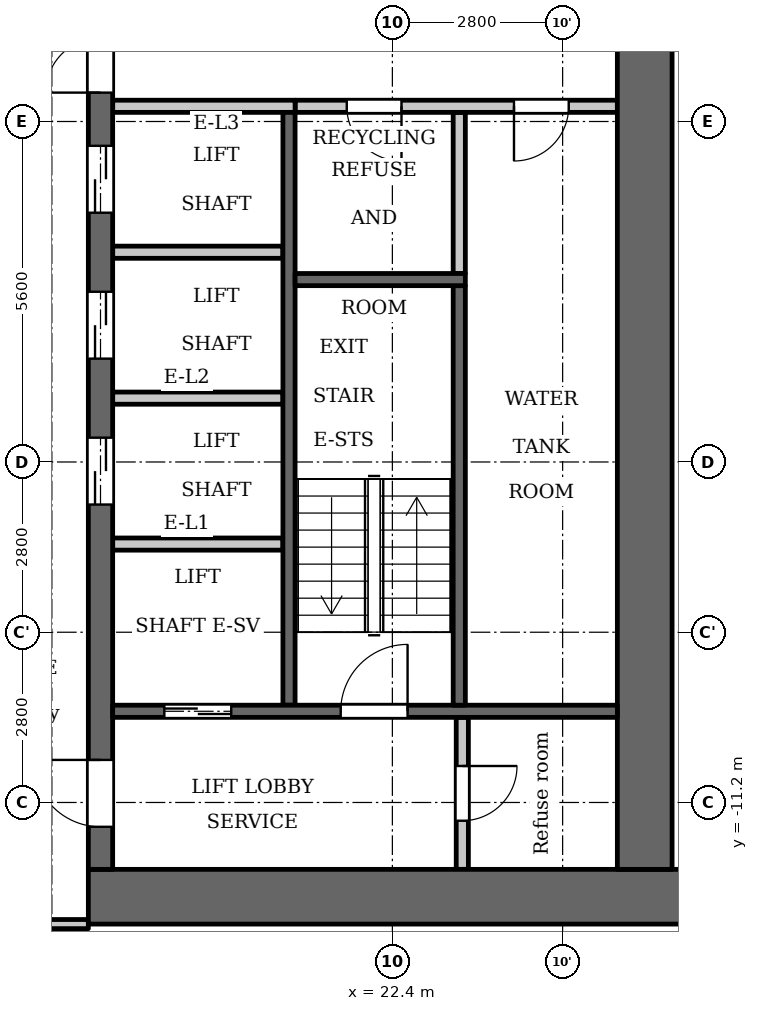
"""IFC4 building model, lengths in metres.
Left out: names, types, materials, properties, quantities, classifications, styles, units other than length and angle.
Written with IfcOpenShell. Run it as: python <this file> out.ifc"""

import sys

from ifc_helpers import new_model, si_unit, direction, frame, frame_2d, origin, place, context, subcontext, project, spatial, rectangle, extrude, element, fill, save


model = new_model("IFC4")
c1 = context("Model", 3, precision=1e-05, world=origin(), true_north=direction((0.0, 1.0)))
c2 = subcontext(c1, "Body", "Model", "MODEL_VIEW")
j1 = project(units=[si_unit("LENGTHUNIT", "METRE"), si_unit("PLANEANGLEUNIT", "RADIAN")], contexts=[c1])
p1 = place(None, origin())
s1 = spatial("IfcSite", under=j1, at=p1, CompositionType="ELEMENT")
p2 = place(p1, origin())
s2 = spatial("IfcBuilding", under=s1, at=p2, CompositionType="ELEMENT")
p3 = place(p2, frame((0.0, 0.0, 69.0)))
s3 = spatial("IfcBuildingStorey", under=s2, at=p3, CompositionType="ELEMENT", Elevation=69.0)
p4 = place(p3, frame((23.5, -2.5, 0.0), z_axis=(0.0, 0.0, 1.0), x_axis=(0.0, 1.0, 0.0)))
e1 = element("IfcWall", 1, at=p4, inside=s3, PredefinedType="PARTITIONING", context=c2, shape_type="SweptSolid", body=[
    extrude(rectangle(XDim=2.65, YDim=0.2, at=frame_2d((1.325, 0.0))), origin(), (0.0, 0.0, 1.0), 3.15),
])
p5 = place(p3, frame((20.7, -9.6, 0.0), z_axis=(0.0, 0.0, 1.0), x_axis=(0.0, 1.0, 0.0)))
e2 = element("IfcWall", 2, at=p5, inside=s3, PredefinedType="SHEAR", context=c2, shape_type="SweptSolid", body=[
    extrude(rectangle(XDim=9.75, YDim=0.2, at=frame_2d((4.875, 0.0))), origin(), (0.0, 0.0, 1.0), 3.15),
])
p6 = place(p3, frame((20.8, 0.25, 0.0), z_axis=(0.0, 0.0, 1.0), x_axis=(1.0, 0.0, 0.0)))
e3 = element("IfcWall", 3, at=p6, inside=s3, PredefinedType="PARTITIONING", context=c2, shape_type="SweptSolid", body=[
    extrude(rectangle(XDim=5.3, YDim=0.2, at=frame_2d((2.65, 0.0))), origin(), (0.0, 0.0, 1.0), 3.15),
])
p7 = place(p6, frame((0.85, 0.0, 0.0)))
e4 = element("IfcOpeningElement", 4, at=p7, cuts=e3, PredefinedType="OPENING", context=c2, shape_type="SweptSolid", body=[
    extrude(rectangle(XDim=0.9, YDim=2.1, at=frame_2d((0.45, 1.05))), frame((0.0, 0.11, 0.0), z_axis=(0.0, -1.0, 0.0), x_axis=(1.0, 0.0, 0.0)), (0.0, 0.0, 1.0), 0.22),
])
p8 = place(p6, frame((3.6, 0.0, 0.0)))
e5 = element("IfcOpeningElement", 5, at=p8, cuts=e3, PredefinedType="OPENING", context=c2, shape_type="SweptSolid", body=[
    extrude(rectangle(XDim=0.9, YDim=2.1, at=frame_2d((0.45, 1.05))), frame((0.0, 0.11, 0.0), z_axis=(0.0, -1.0, 0.0), x_axis=(1.0, 0.0, 0.0)), (0.0, 0.0, 1.0), 0.22),
])
p9 = place(p3, frame((17.4, -12.75, 0.0), z_axis=(0.0, 0.0, 1.0), x_axis=(1.0, 0.0, 0.0)))
e6 = element("IfcWall", 6, at=p9, inside=s3, PredefinedType="SHEAR", context=c2, shape_type="SweptSolid", body=[
    extrude(rectangle(XDim=10.4, YDim=0.9, at=frame_2d((5.2, 0.0))), origin(), (0.0, 0.0, 1.0), 3.15),
])
p10 = place(p3, frame((17.6, -12.3, 0.0), z_axis=(0.0, 0.0, 1.0), x_axis=(0.0, 1.0, 0.0)))
e7 = element("IfcWall", 7, at=p10, inside=s3, PredefinedType="SHEAR", context=c2, shape_type="SweptSolid", body=[
    extrude(rectangle(XDim=24.6, YDim=0.4, at=frame_2d((12.3, 0.0))), origin(), (0.0, 0.0, 1.0), 3.15),
])
p11 = place(p10, frame((6.0, 0.0, 0.0)))
e8 = element("IfcOpeningElement", 8, at=p11, cuts=e7, PredefinedType="OPENING", context=c2, shape_type="SweptSolid", body=[
    extrude(rectangle(XDim=1.1, YDim=2.1, at=frame_2d((0.55, 1.05))), frame((0.0, 0.21, 0.0), z_axis=(0.0, -1.0, 0.0), x_axis=(1.0, 0.0, 0.0)), (0.0, 0.0, 1.0), 0.42),
])
p12 = place(p10, frame((8.4, 0.0, 0.0)))
e9 = element("IfcOpeningElement", 9, at=p12, cuts=e7, PredefinedType="OPENING", context=c2, shape_type="SweptSolid", body=[
    extrude(rectangle(XDim=1.1, YDim=2.1, at=frame_2d((0.55, 1.05))), frame((0.0, 0.21, 0.0), z_axis=(0.0, -1.0, 0.0), x_axis=(1.0, 0.0, 0.0)), (0.0, 0.0, 1.0), 0.42),
])
p13 = place(p10, frame((10.8, 0.0, 0.0)))
e10 = element("IfcOpeningElement", 10, at=p13, cuts=e7, PredefinedType="OPENING", context=c2, shape_type="SweptSolid", body=[
    extrude(rectangle(XDim=1.1, YDim=2.1, at=frame_2d((0.55, 1.05))), frame((0.0, 0.21, 0.0), z_axis=(0.0, -1.0, 0.0), x_axis=(1.0, 0.0, 0.0)), (0.0, 0.0, 1.0), 0.42),
])
p14 = place(p10, frame((16.75, 0.0, 0.0)))
e11 = element("IfcOpeningElement", 11, at=p14, cuts=e7, PredefinedType="OPENING", context=c2, shape_type="SweptSolid", body=[
    extrude(rectangle(XDim=0.9, YDim=2.1, at=frame_2d((0.45, 1.05))), frame((0.0, 0.21, 0.0), z_axis=(0.0, -1.0, 0.0), x_axis=(1.0, 0.0, 0.0)), (0.0, 0.0, 1.0), 0.42),
])
p15 = place(p10, frame((22.8, 0.0, 0.0)))
e12 = element("IfcOpeningElement", 12, at=p15, cuts=e7, PredefinedType="OPENING", context=c2, shape_type="SweptSolid", body=[
    extrude(rectangle(XDim=1.1, YDim=2.1, at=frame_2d((0.55, 1.05))), frame((0.0, 0.21, 0.0), z_axis=(0.0, -1.0, 0.0), x_axis=(1.0, 0.0, 0.0)), (0.0, 0.0, 1.0), 0.42),
])
p16 = place(p10, frame((0.7, 0.0, 0.0)))
e13 = element("IfcOpeningElement", 13, at=p16, cuts=e7, PredefinedType="OPENING", context=c2, shape_type="SweptSolid", body=[
    extrude(rectangle(XDim=1.1, YDim=2.1, at=frame_2d((0.55, 1.05))), frame((0.0, 0.21, 0.0), z_axis=(0.0, -1.0, 0.0), x_axis=(1.0, 0.0, 0.0)), (0.0, 0.0, 1.0), 0.42),
])
p17 = place(p10, frame((12.775, 0.0, 0.0)))
e14 = element("IfcOpeningElement", 14, at=p17, cuts=e7, PredefinedType="OPENING", context=c2, shape_type="SweptSolid", body=[
    extrude(rectangle(XDim=1.8, YDim=2.1, at=frame_2d((0.9, 1.05))), frame((0.0, 0.21, 0.0), z_axis=(0.0, -1.0, 0.0), x_axis=(1.0, 0.0, 0.0)), (0.0, 0.0, 1.0), 0.42),
])
p18 = place(p3, frame((26.55, -12.3, 0.0), z_axis=(0.0, 0.0, 1.0), x_axis=(0.0, 1.0, 0.0)))
e15 = element("IfcWall", 15, at=p18, inside=s3, PredefinedType="SHEAR", context=c2, shape_type="SweptSolid", body=[
    extrude(rectangle(XDim=24.6, YDim=0.9, at=frame_2d((12.3, 0.0))), origin(), (0.0, 0.0, 1.0), 3.15),
])
p19 = place(p3, frame((23.55, -12.3, 0.0), z_axis=(0.0, 0.0, 1.0), x_axis=(0.0, 1.0, 0.0)))
e16 = element("IfcWall", 16, at=p19, inside=s3, PredefinedType="PARTITIONING", context=c2, shape_type="SweptSolid", body=[
    extrude(rectangle(XDim=2.5, YDim=0.2, at=frame_2d((1.25, 0.0))), origin(), (0.0, 0.0, 1.0), 3.15),
])
p20 = place(p19, frame((0.8, 0.0, 0.0)))
e17 = element("IfcOpeningElement", 17, at=p20, cuts=e16, PredefinedType="OPENING", context=c2, shape_type="SweptSolid", body=[
    extrude(rectangle(XDim=0.9, YDim=2.1, at=frame_2d((0.45, 1.05))), frame((0.0, 0.11, 0.0), z_axis=(0.0, -1.0, 0.0), x_axis=(1.0, 0.0, 0.0)), (0.0, 0.0, 1.0), 0.22),
])
p21 = place(p3, frame((17.8, -9.7, 0.0), z_axis=(0.0, 0.0, 1.0), x_axis=(1.0, 0.0, 0.0)))
e18 = element("IfcWall", 18, at=p21, inside=s3, PredefinedType="SHEAR", context=c2, shape_type="SweptSolid", body=[
    extrude(rectangle(XDim=8.3, YDim=0.2, at=frame_2d((4.15, 0.0))), origin(), (0.0, 0.0, 1.0), 3.15),
])
p22 = place(p21, frame((0.85, 0.0, 0.0)))
e19 = element("IfcOpeningElement", 19, at=p22, cuts=e18, PredefinedType="OPENING", context=c2, shape_type="SweptSolid", body=[
    extrude(rectangle(XDim=1.1, YDim=2.1, at=frame_2d((0.55, 1.05))), frame((0.0, 0.11, 0.0), z_axis=(0.0, -1.0, 0.0), x_axis=(1.0, 0.0, 0.0)), (0.0, 0.0, 1.0), 0.22),
])
p23 = place(p21, frame((3.75, 0.0, 0.0)))
e20 = element("IfcOpeningElement", 20, at=p23, cuts=e18, PredefinedType="OPENING", context=c2, shape_type="SweptSolid", body=[
    extrude(rectangle(XDim=1.1, YDim=2.1, at=frame_2d((0.55, 1.05))), frame((0.0, 0.11, 0.0), z_axis=(0.0, -1.0, 0.0), x_axis=(1.0, 0.0, 0.0)), (0.0, 0.0, 1.0), 0.22),
])
for number, where, z_axis, x_axis in (
    (21, (17.8, -6.95, 0.0), (0.0, 0.0, 1.0), (1.0, 0.0, 0.0)),
    (22, (17.8, -4.55, 0.0), (0.0, 0.0, 1.0), (1.0, 0.0, 0.0)),
    (23, (17.8, -2.15, 0.0), (0.0, 0.0, 1.0), (1.0, 0.0, 0.0)),
):
    element("IfcWall", number, at=place(p3, frame(where, z_axis=z_axis, x_axis=x_axis)), inside=s3, PredefinedType="PARTITIONING", context=c2, shape_type="SweptSolid", body=[
        extrude(rectangle(XDim=2.8, YDim=0.2, at=frame_2d((1.4, 0.0))), origin(), (0.0, 0.0, 1.0), 3.15),
    ])
p24 = place(p3, frame((17.8, 0.25, 0.0), z_axis=(0.0, 0.0, 1.0), x_axis=(1.0, 0.0, 0.0)))
e24 = element("IfcWall", 24, at=p24, inside=s3, PredefinedType="PARTITIONING", context=c2, shape_type="SweptSolid", body=[
    extrude(rectangle(XDim=3.0, YDim=0.2, at=frame_2d((1.5, 0.0))), origin(), (0.0, 0.0, 1.0), 3.15),
])
p25 = place(p3, frame((23.5, -9.6, 0.0), z_axis=(0.0, 0.0, 1.0), x_axis=(0.0, 1.0, 0.0)))
e25 = element("IfcWall", 25, at=p25, inside=s3, PredefinedType="SHEAR", context=c2, shape_type="SweptSolid", body=[
    extrude(rectangle(XDim=6.9, YDim=0.2, at=frame_2d((3.45, 0.0))), origin(), (0.0, 0.0, 1.0), 3.15),
])
p26 = place(p3, frame((20.8, -2.6, 0.0), z_axis=(0.0, 0.0, 1.0), x_axis=(1.0, 0.0, 0.0)))
e26 = element("IfcWall", 26, at=p26, inside=s3, PredefinedType="SHEAR", context=c2, shape_type="SweptSolid", body=[
    extrude(rectangle(XDim=2.8, YDim=0.2, at=frame_2d((1.4, 0.0))), origin(), (0.0, 0.0, 1.0), 3.15),
])
p27 = place(p3, frame((-17.4, -13.2, 0.0), z_axis=(0.0, 0.0, 1.0), x_axis=(1.0, 0.0, 0.0)))
e27 = element("IfcWall", 27, at=p27, inside=s3, PredefinedType="PARTITIONING", context=c2, shape_type="SweptSolid", body=[
    extrude(rectangle(XDim=34.8, YDim=0.15, at=frame_2d((17.4, 0.0))), origin(), (0.0, 0.0, 1.0), 3.15),
])
p28 = place(p27, frame((0.65, 0.0, 0.0)))
e28 = element("IfcOpeningElement", 28, at=p28, cuts=e27, PredefinedType="OPENING", context=c2, shape_type="SweptSolid", body=[
    extrude(rectangle(XDim=1.0, YDim=2.1, at=frame_2d((0.5, 1.05))), frame((0.0, 0.085, 0.0), z_axis=(0.0, -1.0, 0.0), x_axis=(1.0, 0.0, 0.0)), (0.0, 0.0, 1.0), 0.17),
])
p29 = place(p27, frame((33.05, 0.0, 0.0)))
e29 = element("IfcOpeningElement", 29, at=p29, cuts=e27, PredefinedType="OPENING", context=c2, shape_type="SweptSolid", body=[
    extrude(rectangle(XDim=1.0, YDim=2.1, at=frame_2d((0.5, 1.05))), frame((0.0, 0.085, 0.0), z_axis=(0.0, -1.0, 0.0), x_axis=(1.0, 0.0, 0.0)), (0.0, 0.0, 1.0), 0.17),
])
p30 = place(p27, frame((4.55, 0.0, 0.0)))
e30 = element("IfcOpeningElement", 30, at=p30, cuts=e27, PredefinedType="OPENING", context=c2, shape_type="SweptSolid", body=[
    extrude(rectangle(XDim=1.0, YDim=2.1, at=frame_2d((0.5, 1.05))), frame((0.0, 0.085, 0.0), z_axis=(0.0, -1.0, 0.0), x_axis=(1.0, 0.0, 0.0)), (0.0, 0.0, 1.0), 0.17),
])
p31 = place(p27, frame((15.75, 0.0, 0.0)))
e31 = element("IfcOpeningElement", 31, at=p31, cuts=e27, PredefinedType="OPENING", context=c2, shape_type="SweptSolid", body=[
    extrude(rectangle(XDim=1.0, YDim=2.1, at=frame_2d((0.5, 1.05))), frame((0.0, 0.085, 0.0), z_axis=(0.0, -1.0, 0.0), x_axis=(1.0, 0.0, 0.0)), (0.0, 0.0, 1.0), 0.17),
])
p32 = place(p27, frame((18.1, 0.0, 0.0)))
e32 = element("IfcOpeningElement", 32, at=p32, cuts=e27, PredefinedType="OPENING", context=c2, shape_type="SweptSolid", body=[
    extrude(rectangle(XDim=1.0, YDim=2.1, at=frame_2d((0.5, 1.05))), frame((0.0, 0.085, 0.0), z_axis=(0.0, -1.0, 0.0), x_axis=(1.0, 0.0, 0.0)), (0.0, 0.0, 1.0), 0.17),
])
p33 = place(p27, frame((26.95, 0.0, 0.0)))
e33 = element("IfcOpeningElement", 33, at=p33, cuts=e27, PredefinedType="OPENING", context=c2, shape_type="SweptSolid", body=[
    extrude(rectangle(XDim=1.0, YDim=2.1, at=frame_2d((0.5, 1.05))), frame((0.0, 0.085, 0.0), z_axis=(0.0, -1.0, 0.0), x_axis=(1.0, 0.0, 0.0)), (0.0, 0.0, 1.0), 0.17),
])
p34 = place(p22, origin())
e34 = element("IfcDoor", 34, at=p34, inside=s3, OperationType="DOUBLE_DOOR_SLIDING", PredefinedType="DOOR", context=c2, shape_type="SweptSolid", body=[
    extrude(rectangle(XDim=1.1, YDim=2.1, at=frame_2d((0.55, 1.05))), frame((0.0, 0.025, 0.0), z_axis=(0.0, -1.0, 0.0), x_axis=(1.0, 0.0, 0.0)), (0.0, 0.0, 1.0), 0.05),
])
fill(e19, e34)
p35 = place(p11, origin())
e35 = element("IfcDoor", 35, at=p35, inside=s3, OperationType="DOUBLE_DOOR_SLIDING", PredefinedType="DOOR", context=c2, shape_type="SweptSolid", body=[
    extrude(rectangle(XDim=1.1, YDim=2.1, at=frame_2d((0.55, 1.05))), frame((0.0, 0.025, 0.0), z_axis=(0.0, -1.0, 0.0), x_axis=(1.0, 0.0, 0.0)), (0.0, 0.0, 1.0), 0.05),
])
fill(e8, e35)
p36 = place(p12, origin())
e36 = element("IfcDoor", 36, at=p36, inside=s3, OperationType="DOUBLE_DOOR_SLIDING", PredefinedType="DOOR", context=c2, shape_type="SweptSolid", body=[
    extrude(rectangle(XDim=1.1, YDim=2.1, at=frame_2d((0.55, 1.05))), frame((0.0, 0.025, 0.0), z_axis=(0.0, -1.0, 0.0), x_axis=(1.0, 0.0, 0.0)), (0.0, 0.0, 1.0), 0.05),
])
fill(e9, e36)
p37 = place(p13, origin())
e37 = element("IfcDoor", 37, at=p37, inside=s3, OperationType="DOUBLE_DOOR_SLIDING", PredefinedType="DOOR", context=c2, shape_type="SweptSolid", body=[
    extrude(rectangle(XDim=1.1, YDim=2.1, at=frame_2d((0.55, 1.05))), frame((0.0, 0.025, 0.0), z_axis=(0.0, -1.0, 0.0), x_axis=(1.0, 0.0, 0.0)), (0.0, 0.0, 1.0), 0.05),
])
fill(e10, e37)
p38 = place(p16, origin())
e38 = element("IfcDoor", 38, at=p38, inside=s3, OperationType="SINGLE_SWING_LEFT", PredefinedType="DOOR", context=c2, shape_type="SweptSolid", body=[
    extrude(rectangle(XDim=1.1, YDim=2.1, at=frame_2d((0.55, 1.05))), frame((0.0, 0.025, 0.0), z_axis=(0.0, -1.0, 0.0), x_axis=(1.0, 0.0, 0.0)), (0.0, 0.0, 1.0), 0.05),
])
fill(e13, e38)
p39 = place(p20, origin())
e39 = element("IfcDoor", 39, at=p39, inside=s3, OperationType="SINGLE_SWING_RIGHT", PredefinedType="DOOR", context=c2, shape_type="SweptSolid", body=[
    extrude(rectangle(XDim=0.9, YDim=2.1, at=frame_2d((0.45, 1.05))), frame((0.0, 0.025, 0.0), z_axis=(0.0, -1.0, 0.0), x_axis=(1.0, 0.0, 0.0)), (0.0, 0.0, 1.0), 0.05),
])
fill(e17, e39)
p40 = place(p23, origin())
e40 = element("IfcDoor", 40, at=p40, inside=s3, OperationType="SINGLE_SWING_LEFT", PredefinedType="DOOR", context=c2, shape_type="SweptSolid", body=[
    extrude(rectangle(XDim=1.1, YDim=2.1, at=frame_2d((0.55, 1.05))), frame((0.0, 0.025, 0.0), z_axis=(0.0, -1.0, 0.0), x_axis=(1.0, 0.0, 0.0)), (0.0, 0.0, 1.0), 0.05),
])
fill(e20, e40)
p41 = place(p17, origin())
e41 = element("IfcDoor", 41, at=p41, inside=s3, OperationType="DOUBLE_DOOR_SINGLE_SWING", PredefinedType="DOOR", context=c2, shape_type="SweptSolid", body=[
    extrude(rectangle(XDim=1.8, YDim=2.1, at=frame_2d((0.9, 1.05))), frame((0.0, 0.025, 0.0), z_axis=(0.0, -1.0, 0.0), x_axis=(1.0, 0.0, 0.0)), (0.0, 0.0, 1.0), 0.05),
])
fill(e14, e41)
p42 = place(p7, origin())
e42 = element("IfcDoor", 42, at=p42, inside=s3, OperationType="SINGLE_SWING_RIGHT", PredefinedType="DOOR", context=c2, shape_type="SweptSolid", body=[
    extrude(rectangle(XDim=0.9, YDim=2.1, at=frame_2d((0.45, 1.05))), frame((0.0, 0.025, 0.0), z_axis=(0.0, -1.0, 0.0), x_axis=(1.0, 0.0, 0.0)), (0.0, 0.0, 1.0), 0.05),
])
fill(e4, e42)
p43 = place(p8, origin())
e43 = element("IfcDoor", 43, at=p43, inside=s3, OperationType="SINGLE_SWING_LEFT", PredefinedType="DOOR", context=c2, shape_type="SweptSolid", body=[
    extrude(rectangle(XDim=0.9, YDim=2.1, at=frame_2d((0.45, 1.05))), frame((0.0, 0.025, 0.0), z_axis=(0.0, -1.0, 0.0), x_axis=(1.0, 0.0, 0.0)), (0.0, 0.0, 1.0), 0.05),
])
fill(e5, e43)
save(model, sys.argv[1])
